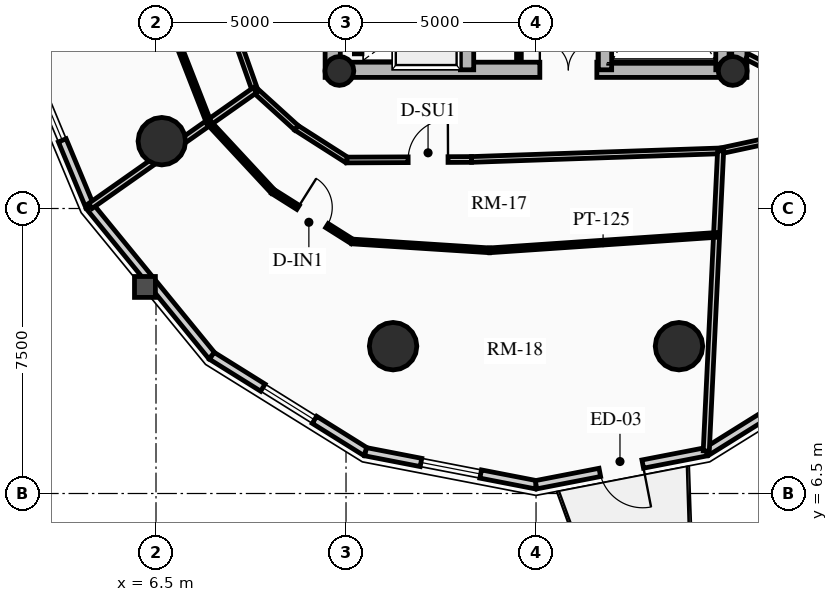
"""IFC4 building model, lengths in metres.
Left out: names, types, materials, properties, quantities, classifications, styles, units other than length and angle.
Written with IfcOpenShell. Run it as: python <this file> out.ifc"""

import sys

from ifc_helpers import new_model, si_unit, direction, frame, frame_2d, origin, origin_2d, place, context, subcontext, project, spatial, rectangle, circle, hollow_circle, extrude, source, transform, mapped, element, fill, save


model = new_model("IFC4")
c1 = context("Model", 3, precision=1e-05, world=origin(), true_north=direction((0.0, 1.0)))
c2 = subcontext(c1, "Body", "Model", "MODEL_VIEW")
j1 = project(units=[si_unit("LENGTHUNIT", "METRE"), si_unit("PLANEANGLEUNIT", "RADIAN")], contexts=[c1])
p1 = place(None, origin())
s1 = spatial("IfcSite", under=j1, at=p1, CompositionType="ELEMENT")
p2 = place(p1, origin())
s2 = spatial("IfcBuilding", under=s1, at=p2, CompositionType="ELEMENT")
p3 = place(p2, frame((0.0, 0.0, 163.24)))
s3 = spatial("IfcBuildingStorey", under=s2, at=p3, CompositionType="ELEMENT", Elevation=163.24)
for number, where, z_axis, x_axis in (
    (1, (11.15, 17.45, 0.0), (0.0, 0.0, 1.0), (0.0, 1.0, 0.0)),
    (2, (21.85, 17.45, 0.0), (0.0, 0.0, 1.0), (0.0, 1.0, 0.0)),
):
    element("IfcWall", number, at=place(p3, frame(where, z_axis=z_axis, x_axis=x_axis)), inside=s3, PredefinedType="SHEAR", context=c2, shape_type="SweptSolid", body=[
        extrude(rectangle(XDim=14.1, YDim=0.4, at=frame_2d((7.05, 0.0))), origin(), (0.0, 0.0, 1.0), 2.91),
    ])
p4 = place(p3, frame((11.15, 17.65, 0.0), z_axis=(0.0, 0.0, 1.0), x_axis=(1.0, 0.0, 0.0)))
e3 = element("IfcWall", 3, at=p4, inside=s3, PredefinedType="SHEAR", context=c2, shape_type="SweptSolid", body=[
    extrude(rectangle(XDim=10.7, YDim=0.4, at=frame_2d((5.35, 0.0))), origin(), (0.0, 0.0, 1.0), 2.91),
])
m1 = source(origin(), c2, "Body", "SweptSolid", [
    extrude(rectangle(XDim=1.5, YDim=2.02, at=frame_2d((0.75, 1.01))), frame((0.0, 0.21, 0.0), z_axis=(0.0, -1.0, 0.0), x_axis=(1.0, 0.0, 0.0)), (0.0, 0.0, 1.0), 0.42),
])
p5 = place(p4, frame((5.45, 0.0, 0.0)))
e4 = element("IfcOpeningElement", 4, at=p5, cuts=e3, PredefinedType="OPENING", context=c2, shape_type="MappedRepresentation", body=[
    mapped(m1, transform((0.0, 0.0, 0.0), x_axis=(1.0, 0.0, 0.0), y_axis=(0.0, 1.0, 0.0), z_axis=(0.0, 0.0, 1.0), scale=1.0)),
])
p6 = place(p3, frame((14.685, 17.65, 0.0), z_axis=(0.0, 0.0, 1.0), x_axis=(0.0, 1.0, 0.0)))
e5 = element("IfcWall", 5, at=p6, inside=s3, PredefinedType="SHEAR", context=c2, shape_type="SweptSolid", body=[
    extrude(rectangle(XDim=13.7, YDim=0.35, at=frame_2d((6.85, 0.0))), origin(), (0.0, 0.0, 1.0), 2.91),
])
m2 = source(origin(), c2, "Body", "SweptSolid", [
    extrude(rectangle(XDim=1.1, YDim=2.015, at=frame_2d((0.55, 1.007))), frame((0.0, 0.185, 0.0), z_axis=(0.0, -1.0, 0.0), x_axis=(1.0, 0.0, 0.0)), (0.0, 0.0, 1.0), 0.37),
])
p7 = place(p6, frame((4.85, 0.0, 0.0)))
e6 = element("IfcOpeningElement", 6, at=p7, cuts=e5, PredefinedType="OPENING", context=c2, shape_type="MappedRepresentation", body=[
    mapped(m2, transform((0.0, 0.0, 0.0), x_axis=(1.0, 0.0, 0.0), y_axis=(0.0, 1.0, 0.0), z_axis=(0.0, 0.0, 1.0), scale=1.0)),
])
p8 = place(p6, frame((0.625, 0.0, 0.0)))
e7 = element("IfcOpeningElement", 7, at=p8, cuts=e5, PredefinedType="OPENING", context=c2, shape_type="MappedRepresentation", body=[
    mapped(m2, transform((0.0, 0.0, 0.0), x_axis=(1.0, 0.0, 0.0), y_axis=(0.0, 1.0, 0.0), z_axis=(0.0, 0.0, 1.0), scale=1.0)),
])
p9 = place(p6, frame((2.625, 0.0, 0.0)))
e8 = element("IfcOpeningElement", 8, at=p9, cuts=e5, PredefinedType="OPENING", context=c2, shape_type="MappedRepresentation", body=[
    mapped(m2, transform((0.0, 0.0, 0.0), x_axis=(1.0, 0.0, 0.0), y_axis=(0.0, 1.0, 0.0), z_axis=(0.0, 0.0, 1.0), scale=1.0)),
])
m3 = source(origin(), c2, "Body", "SweptSolid", [
    extrude(rectangle(XDim=1.15, YDim=2.02, at=frame_2d((0.575, 1.01))), frame((0.0, 0.185, 0.0), z_axis=(0.0, -1.0, 0.0), x_axis=(1.0, 0.0, 0.0)), (0.0, 0.0, 1.0), 0.37),
])
p10 = place(p6, frame((7.27, 0.0, 0.0)))
e9 = element("IfcOpeningElement", 9, at=p10, cuts=e5, PredefinedType="OPENING", context=c2, shape_type="MappedRepresentation", body=[
    mapped(m3, transform((0.0, 0.0, 0.0), x_axis=(1.0, 0.0, 0.0), y_axis=(0.0, 1.0, 0.0), z_axis=(0.0, 0.0, 1.0), scale=1.0)),
])
p11 = place(p3, frame((18.315, 17.65, 0.0), z_axis=(0.0, 0.0, 1.0), x_axis=(0.0, 1.0, 0.0)))
e10 = element("IfcWall", 10, at=p11, inside=s3, PredefinedType="SHEAR", context=c2, shape_type="SweptSolid", body=[
    extrude(rectangle(XDim=9.6, YDim=0.35, at=frame_2d((4.8, 0.0))), origin(), (0.0, 0.0, 1.0), 2.91),
])
p12 = place(p11, frame((5.28, 0.0, 0.0)))
e11 = element("IfcOpeningElement", 11, at=p12, cuts=e10, PredefinedType="OPENING", context=c2, shape_type="MappedRepresentation", body=[
    mapped(m3, transform((0.0, 0.0, 0.0), x_axis=(1.0, 0.0, 0.0), y_axis=(0.0, 1.0, 0.0), z_axis=(0.0, 0.0, 1.0), scale=1.0)),
])
p13 = place(p3, frame((21.405, 17.65, 0.0), z_axis=(0.0, 0.0, 1.0), x_axis=(0.0, 1.0, 0.0)))
e12 = element("IfcWall", 12, at=p13, inside=s3, PredefinedType="SHEAR", context=c2, shape_type="SweptSolid", body=[
    extrude(rectangle(XDim=6.695, YDim=0.35, at=frame_2d((3.348, 0.0))), origin(), (0.0, 0.0, 1.0), 2.91),
])
for number, where, z_axis, x_axis in (
    (13, (11.325, 17.62, 0.0), (0.0, 0.0, 1.0), (1.0, 0.0, 0.0)),
    (14, (21.675, 17.62, 0.0), (0.0, 0.0, 1.0), (1.0, 0.0, 0.0)),
):
    element("IfcColumn", number, at=place(p3, frame(where, z_axis=z_axis, x_axis=x_axis)), inside=s3, PredefinedType="COLUMN", context=c2, shape_type="SweptSolid", body=[
        extrude(hollow_circle(Radius=0.38, WallThickness=0.032, at=origin_2d()), origin(), (0.0, 0.0, 1.0), 2.91),
    ])
for number, where, z_axis, x_axis in (
    (15, (6.653, 15.771, 0.0), (0.0, 0.0, 1.0), (1.0, 0.0, 0.0)),
    (16, (12.739, 10.377, 0.0), (0.0, 0.0, 1.0), (1.0, 0.0, 0.0)),
    (17, (20.261, 10.377, 0.0), (0.0, 0.0, 1.0), (1.0, 0.0, 0.0)),
):
    element("IfcColumn", number, at=place(p3, frame(where, z_axis=z_axis, x_axis=x_axis)), inside=s3, PredefinedType="USERDEFINED", context=c2, shape_type="SweptSolid", body=[
        extrude(circle(Radius=0.625, at=origin_2d()), origin(), (0.0, 0.0, 1.0), 2.91),
    ])
p14 = place(p3, frame((4.757, 14.055, 0.0), z_axis=(0.0, 0.0, 1.0), x_axis=(-0.384259959969, 0.923224936386, 0.0)))
e18 = element("IfcWall", 18, at=p14, inside=s3, PredefinedType="SOLIDWALL", context=c2, shape_type="SweptSolid", body=[
    extrude(rectangle(XDim=5.365, YDim=0.22, at=frame_2d((2.683, 0.0))), origin(), (0.0, 0.0, 1.0), 2.245),
])
m4 = source(origin(), c2, "Body", "SweptSolid", [
    extrude(rectangle(XDim=1.6, YDim=1.3, at=frame_2d((0.8, 0.65))), frame((0.0, 0.12, 0.0), z_axis=(0.0, -1.0, 0.0), x_axis=(1.0, 0.0, 0.0)), (0.0, 0.0, 1.0), 0.24),
])
p15 = place(p14, frame((1.883, 0.0, 0.65)))
e19 = element("IfcOpeningElement", 19, at=p15, cuts=e18, PredefinedType="OPENING", context=c2, shape_type="MappedRepresentation", body=[
    mapped(m4, transform((0.0, 0.0, 0.0), x_axis=(1.0, 0.0, 0.0), y_axis=(0.0, 1.0, 0.0), z_axis=(0.0, 0.0, 1.0), scale=1.0)),
])
p16 = place(p3, frame((7.968, 10.124, 0.0), z_axis=(0.0, 0.0, 1.0), x_axis=(-0.632598524901, 0.774479894053, 0.0)))
e20 = element("IfcWall", 20, at=p16, inside=s3, PredefinedType="SOLIDWALL", context=c2, shape_type="SweptSolid", body=[
    extrude(rectangle(XDim=5.076, YDim=0.22, at=frame_2d((2.538, 0.0))), origin(), (0.0, 0.0, 1.0), 2.245),
])
p17 = place(p3, frame((12.015, 7.6, 0.0), z_axis=(0.0, 0.0, 1.0), x_axis=(-0.848452391194, 0.529271707044, 0.0)))
e21 = element("IfcWall", 21, at=p17, inside=s3, PredefinedType="SOLIDWALL", context=c2, shape_type="SweptSolid", body=[
    extrude(rectangle(XDim=4.769, YDim=0.22, at=frame_2d((2.385, 0.0))), origin(), (0.0, 0.0, 1.0), 2.245),
])
p18 = place(p17, frame((1.585, 0.0, 0.65)))
e22 = element("IfcOpeningElement", 22, at=p18, cuts=e21, PredefinedType="OPENING", context=c2, shape_type="MappedRepresentation", body=[
    mapped(m4, transform((0.0, 0.0, 0.0), x_axis=(1.0, 0.0, 0.0), y_axis=(0.0, 1.0, 0.0), z_axis=(0.0, 0.0, 1.0), scale=1.0)),
])
p19 = place(p3, frame((16.5, 6.73, 0.0), z_axis=(0.0, 0.0, 1.0), x_axis=(-0.981718699963, 0.190337579429, 0.0)))
e23 = element("IfcWall", 23, at=p19, inside=s3, PredefinedType="SOLIDWALL", context=c2, shape_type="SweptSolid", body=[
    extrude(rectangle(XDim=4.569, YDim=0.22, at=frame_2d((2.284, 0.0))), origin(), (0.0, 0.0, 1.0), 2.245),
])
p20 = place(p19, frame((1.484, 0.0, 0.65)))
e24 = element("IfcOpeningElement", 24, at=p20, cuts=e23, PredefinedType="OPENING", context=c2, shape_type="MappedRepresentation", body=[
    mapped(m4, transform((0.0, 0.0, 0.0), x_axis=(1.0, 0.0, 0.0), y_axis=(0.0, 1.0, 0.0), z_axis=(0.0, 0.0, 1.0), scale=1.0)),
])
p21 = place(p3, frame((20.985, 7.6, 0.0), z_axis=(0.0, 0.0, 1.0), x_axis=(-0.981718699963, -0.190337579429, 0.0)))
e25 = element("IfcWall", 25, at=p21, inside=s3, PredefinedType="SOLIDWALL", context=c2, shape_type="SweptSolid", body=[
    extrude(rectangle(XDim=4.569, YDim=0.22, at=frame_2d((2.284, 0.0))), origin(), (0.0, 0.0, 1.0), 2.245),
])
m5 = source(origin(), c2, "Body", "SweptSolid", [
    extrude(rectangle(XDim=1.15, YDim=2.005, at=frame_2d((0.575, 1.002))), frame((0.0, 0.12, 0.0), z_axis=(0.0, -1.0, 0.0), x_axis=(1.0, 0.0, 0.0)), (0.0, 0.0, 1.0), 0.24),
])
p22 = place(p21, frame((1.709, 0.0, 0.0)))
e26 = element("IfcOpeningElement", 26, at=p22, cuts=e25, PredefinedType="OPENING", context=c2, shape_type="MappedRepresentation", body=[
    mapped(m5, transform((0.0, 0.0, 0.0), x_axis=(1.0, 0.0, 0.0), y_axis=(0.0, 1.0, 0.0), z_axis=(0.0, 0.0, 1.0), scale=1.0)),
])
p23 = place(p3, frame((25.032, 10.124, 0.0), z_axis=(0.0, 0.0, 1.0), x_axis=(-0.848452391194, -0.529271707044, 0.0)))
e27 = element("IfcWall", 27, at=p23, inside=s3, PredefinedType="SOLIDWALL", context=c2, shape_type="SweptSolid", body=[
    extrude(rectangle(XDim=4.769, YDim=0.22, at=frame_2d((2.385, 0.0))), origin(), (0.0, 0.0, 1.0), 2.245),
])
p24 = place(p3, frame((11.82, 18.07, 0.0), z_axis=(0.0, 0.0, 1.0), x_axis=(0.0, 1.0, 0.0)))
e28 = element("IfcWall", 28, at=p24, inside=s3, PredefinedType="SHEAR", context=c2, shape_type="SweptSolid", body=[
    extrude(rectangle(XDim=1.635, YDim=0.2, at=frame_2d((0.817, 0.0))), origin(), (0.0, 0.0, 1.0), 2.91),
])
p25 = place(p3, frame((16.05, 17.92, 0.0), z_axis=(0.0, 0.0, 1.0), x_axis=(0.0, 1.0, 0.0)))
e29 = element("IfcWall", 29, at=p25, inside=s3, PredefinedType="PARTITIONING", context=c2, shape_type="SweptSolid", body=[
    extrude(rectangle(XDim=3.08, YDim=0.125, at=frame_2d((1.54, 0.0))), origin(), (0.0, 0.0, 1.0), 2.675),
])
m6 = source(origin(), c2, "Body", "SweptSolid", [
    extrude(rectangle(XDim=0.9, YDim=2.005, at=frame_2d((0.45, 1.002))), frame((0.0, 0.073, 0.0), z_axis=(0.0, -1.0, 0.0), x_axis=(1.0, 0.0, 0.0)), (0.0, 0.0, 1.0), 0.145),
])
p26 = place(p25, frame((1.05, 0.0, 0.0)))
e30 = element("IfcOpeningElement", 30, at=p26, cuts=e29, PredefinedType="OPENING", context=c2, shape_type="MappedRepresentation", body=[
    mapped(m6, transform((0.0, 0.0, 0.0), x_axis=(1.0, 0.0, 0.0), y_axis=(0.0, 1.0, 0.0), z_axis=(0.0, 0.0, 1.0), scale=1.0)),
])
p27 = place(p3, frame((8.636, 18.436, 0.0), z_axis=(0.0, 0.0, 1.0), x_axis=(0.333211866524, -0.942851977782, 0.0)))
e31 = element("IfcWall", 31, at=p27, inside=s3, PredefinedType="PARTITIONING", context=c2, shape_type="SweptSolid", body=[
    extrude(rectangle(XDim=1.402, YDim=0.15, at=frame_2d((0.701, 0.0))), origin(), (0.0, 0.0, 1.0), 2.245),
])
p28 = place(p3, frame((9.103, 17.115, 0.0), z_axis=(0.0, 0.0, 1.0), x_axis=(0.740186897911, -0.672401186912, 0.0)))
e32 = element("IfcWall", 32, at=p28, inside=s3, PredefinedType="PARTITIONING", context=c2, shape_type="SweptSolid", body=[
    extrude(rectangle(XDim=1.477, YDim=0.15, at=frame_2d((0.738, 0.0))), origin(), (0.0, 0.0, 1.0), 2.245),
])
p29 = place(p3, frame((10.196, 16.122, 0.0), z_axis=(0.0, 0.0, 1.0), x_axis=(0.843021142441, -0.537880426673, 0.0)))
e33 = element("IfcWall", 33, at=p29, inside=s3, PredefinedType="PARTITIONING", context=c2, shape_type="SweptSolid", body=[
    extrude(rectangle(XDim=1.571, YDim=0.15, at=frame_2d((0.786, 0.0))), origin(), (0.0, 0.0, 1.0), 2.245),
])
p30 = place(p3, frame((11.521, 15.276, 0.0), z_axis=(0.0, 0.0, 1.0), x_axis=(0.999990688463, 0.004315436007, 0.0)))
e34 = element("IfcWall", 34, at=p30, inside=s3, PredefinedType="PARTITIONING", context=c2, shape_type="SweptSolid", body=[
    extrude(rectangle(XDim=3.281, YDim=0.15, at=frame_2d((1.641, 0.0))), origin(), (0.0, 0.0, 1.0), 2.245),
])
m7 = source(origin(), c2, "Body", "SweptSolid", [
    extrude(rectangle(XDim=1.05, YDim=2.015, at=frame_2d((0.525, 1.007))), frame((0.0, 0.085, 0.0), z_axis=(0.0, -1.0, 0.0), x_axis=(1.0, 0.0, 0.0)), (0.0, 0.0, 1.0), 0.17),
])
p31 = place(p30, frame((1.613, 0.0, 0.0)))
e35 = element("IfcOpeningElement", 35, at=p31, cuts=e34, PredefinedType="OPENING", context=c2, shape_type="MappedRepresentation", body=[
    mapped(m7, transform((0.0, 0.0, 0.0), x_axis=(1.0, 0.0, 0.0), y_axis=(0.0, 1.0, 0.0), z_axis=(0.0, 0.0, 1.0), scale=1.0)),
])
p32 = place(p3, frame((14.802, 15.291, 0.0), z_axis=(0.0, 0.0, 1.0), x_axis=(0.999405778293, 0.034468686011, 0.0)))
e36 = element("IfcWall", 36, at=p32, inside=s3, PredefinedType="PARTITIONING", context=c2, shape_type="SweptSolid", body=[
    extrude(rectangle(XDim=6.559, YDim=0.15, at=frame_2d((3.279, 0.0))), origin(), (0.0, 0.0, 1.0), 2.245),
])
p33 = place(p3, frame((21.357, 15.517, 0.0), z_axis=(0.0, 0.0, 1.0), x_axis=(0.977773676035, 0.209663154733, 0.0)))
e37 = element("IfcWall", 37, at=p33, inside=s3, PredefinedType="PARTITIONING", context=c2, shape_type="SweptSolid", body=[
    extrude(rectangle(XDim=1.865, YDim=0.15, at=frame_2d((0.933, 0.0))), origin(), (0.0, 0.0, 1.0), 2.245),
])
p34 = place(p3, frame((9.103, 17.115, 0.0), z_axis=(0.0, 0.0, 1.0), x_axis=(-0.817760605426, -0.575558504597, 0.0)))
e38 = element("IfcWall", 38, at=p34, inside=s3, PredefinedType="PARTITIONING", context=c2, shape_type="SweptSolid", body=[
    extrude(rectangle(XDim=5.295, YDim=0.16, at=frame_2d((2.647, 0.0))), origin(), (0.0, 0.0, 1.0), 2.245),
])
p35 = place(p3, frame((21.357, 15.517, 0.0), z_axis=(0.0, 0.0, 1.0), x_axis=(-0.047796931987, -0.998857073506, 0.0)))
e39 = element("IfcWall", 39, at=p35, inside=s3, PredefinedType="PARTITIONING", context=c2, shape_type="SweptSolid", body=[
    extrude(rectangle(XDim=7.907, YDim=0.16, at=frame_2d((3.954, 0.0))), origin(), (0.0, 0.0, 1.0), 2.245),
])
p36 = place(p3, frame((22.05, 18.0, 0.0), z_axis=(0.0, 0.0, 1.0), x_axis=(0.890660222535, -0.454669515136, 0.0)))
e40 = element("IfcWall", 40, at=p36, inside=s3, PredefinedType="PARTITIONING", context=c2, shape_type="SweptSolid", body=[
    extrude(rectangle(XDim=2.144, YDim=0.16, at=frame_2d((1.072, 0.0))), origin(), (0.0, 0.0, 1.0), 2.245),
])
m8 = source(origin(), c2, "Body", "SweptSolid", [
    extrude(rectangle(XDim=1.05, YDim=2.015, at=frame_2d((0.525, 1.007))), frame((0.0, 0.09, 0.0), z_axis=(0.0, -1.0, 0.0), x_axis=(1.0, 0.0, 0.0)), (0.0, 0.0, 1.0), 0.18),
])
p37 = place(p36, frame((0.894, 0.0, 0.0)))
e41 = element("IfcOpeningElement", 41, at=p37, cuts=e40, PredefinedType="OPENING", context=c2, shape_type="MappedRepresentation", body=[
    mapped(m8, transform((0.0, 0.0, 0.0), x_axis=(1.0, 0.0, 0.0), y_axis=(0.0, 1.0, 0.0), z_axis=(0.0, 0.0, 1.0), scale=1.0)),
])
p38 = place(p3, frame((6.978, 18.598, 0.0), z_axis=(0.0, 0.0, 1.0), x_axis=(0.363845250376, -0.931459410698, 0.0)))
e42 = element("IfcWall", 42, at=p38, inside=s3, PredefinedType="PARTITIONING", context=c2, shape_type="SweptSolid", body=[
    extrude(rectangle(XDim=2.509, YDim=0.125, at=frame_2d((1.254, 0.0))), origin(), (0.0, 0.0, 1.0), 2.245),
])
p39 = place(p3, frame((7.891, 16.261, 0.0), z_axis=(0.0, 0.0, 1.0), x_axis=(0.680443535441, -0.7328005152, 0.0)))
e43 = element("IfcWall", 43, at=p39, inside=s3, PredefinedType="PARTITIONING", context=c2, shape_type="SweptSolid", body=[
    extrude(rectangle(XDim=2.476, YDim=0.125, at=frame_2d((1.238, 0.0))), origin(), (0.0, 0.0, 1.0), 2.245),
])
p40 = place(p3, frame((9.576, 14.447, 0.0), z_axis=(0.0, 0.0, 1.0), x_axis=(0.845905204383, -0.53333327779, 0.0)))
e44 = element("IfcWall", 44, at=p40, inside=s3, PredefinedType="PARTITIONING", context=c2, shape_type="SweptSolid", body=[
    extrude(rectangle(XDim=2.465, YDim=0.125, at=frame_2d((1.232, 0.0))), origin(), (0.0, 0.0, 1.0), 2.245),
])
p41 = place(p40, frame((0.782, 0.0, 0.0)))
e45 = element("IfcOpeningElement", 45, at=p41, cuts=e44, PredefinedType="OPENING", context=c2, shape_type="MappedRepresentation", body=[
    mapped(m6, transform((0.0, 0.0, 0.0), x_axis=(1.0, 0.0, 0.0), y_axis=(0.0, 1.0, 0.0), z_axis=(0.0, 0.0, 1.0), scale=1.0)),
])
p42 = place(p3, frame((11.661, 13.132, 0.0), z_axis=(0.0, 0.0, 1.0), x_axis=(0.997932841329, -0.064265419915, 0.0)))
e46 = element("IfcWall", 46, at=p42, inside=s3, PredefinedType="PARTITIONING", context=c2, shape_type="SweptSolid", body=[
    extrude(rectangle(XDim=3.624, YDim=0.125, at=frame_2d((1.812, 0.0))), origin(), (0.0, 0.0, 1.0), 2.245),
])
p43 = place(p3, frame((15.278, 12.899, 0.0), z_axis=(0.0, 0.0, 1.0), x_axis=(0.997695501463, 0.067850470592, 0.0)))
e47 = element("IfcWall", 47, at=p43, inside=s3, PredefinedType="PARTITIONING", context=c2, shape_type="SweptSolid", body=[
    extrude(rectangle(XDim=5.988, YDim=0.125, at=frame_2d((2.994, 0.0))), origin(), (0.0, 0.0, 1.0), 2.245),
])
m9 = source(origin(), c2, "Body", "SweptSolid", [
    extrude(rectangle(XDim=1.6, YDim=1.3, at=frame_2d((0.8, 0.65))), frame((0.0, 0.03, 0.0), z_axis=(0.0, -1.0, 0.0), x_axis=(1.0, 0.0, 0.0)), (0.0, 0.0, 1.0), 0.06),
])
p44 = place(p15, origin())
e48 = element("IfcWindow", 48, at=p44, inside=s3, PartitioningType="SINGLE_PANEL", PredefinedType="WINDOW", context=c2, shape_type="MappedRepresentation", body=[
    mapped(m9, transform((0.0, 0.0, 0.0), x_axis=(1.0, 0.0, 0.0), y_axis=(0.0, 1.0, 0.0), z_axis=(0.0, 0.0, 1.0), scale=1.0)),
])
fill(e19, e48)
p45 = place(p18, origin())
e49 = element("IfcWindow", 49, at=p45, inside=s3, PartitioningType="SINGLE_PANEL", PredefinedType="WINDOW", context=c2, shape_type="MappedRepresentation", body=[
    mapped(m9, transform((0.0, 0.0, 0.0), x_axis=(1.0, 0.0, 0.0), y_axis=(0.0, 1.0, 0.0), z_axis=(0.0, 0.0, 1.0), scale=1.0)),
])
fill(e22, e49)
p46 = place(p20, origin())
e50 = element("IfcWindow", 50, at=p46, inside=s3, PartitioningType="SINGLE_PANEL", PredefinedType="WINDOW", context=c2, shape_type="MappedRepresentation", body=[
    mapped(m9, transform((0.0, 0.0, 0.0), x_axis=(1.0, 0.0, 0.0), y_axis=(0.0, 1.0, 0.0), z_axis=(0.0, 0.0, 1.0), scale=1.0)),
])
fill(e24, e50)
m10 = source(origin(), c2, "Body", "SweptSolid", [
    extrude(rectangle(XDim=1.15, YDim=2.005, at=frame_2d((0.575, 1.002))), frame((0.0, 0.025, 0.0), z_axis=(0.0, -1.0, 0.0), x_axis=(1.0, 0.0, 0.0)), (0.0, 0.0, 1.0), 0.05),
])
p47 = place(p22, origin())
e51 = element("IfcDoor", 51, at=p47, inside=s3, OperationType="SINGLE_SWING_LEFT", PredefinedType="DOOR", context=c2, shape_type="MappedRepresentation", body=[
    mapped(m10, transform((0.0, 0.0, 0.0), x_axis=(1.0, 0.0, 0.0), y_axis=(0.0, 1.0, 0.0), z_axis=(0.0, 0.0, 1.0), scale=1.0)),
])
fill(e26, e51)
m11 = source(origin(), c2, "Body", "SweptSolid", [
    extrude(rectangle(XDim=1.5, YDim=2.02, at=frame_2d((0.75, 1.01))), frame((0.0, 0.025, 0.0), z_axis=(0.0, -1.0, 0.0), x_axis=(1.0, 0.0, 0.0)), (0.0, 0.0, 1.0), 0.05),
])
p48 = place(p5, origin())
e52 = element("IfcDoor", 52, at=p48, inside=s3, OperationType="DOUBLE_DOOR_SINGLE_SWING", PredefinedType="DOOR", context=c2, shape_type="MappedRepresentation", body=[
    mapped(m11, transform((0.0, 0.0, 0.0), x_axis=(1.0, 0.0, 0.0), y_axis=(0.0, 1.0, 0.0), z_axis=(0.0, 0.0, 1.0), scale=1.0)),
])
fill(e4, e52)
m12 = source(origin(), c2, "Body", "SweptSolid", [
    extrude(rectangle(XDim=1.05, YDim=2.015, at=frame_2d((0.525, 1.007))), frame((0.0, 0.025, 0.0), z_axis=(0.0, -1.0, 0.0), x_axis=(1.0, 0.0, 0.0)), (0.0, 0.0, 1.0), 0.05),
])
p49 = place(p31, origin())
e53 = element("IfcDoor", 53, at=p49, inside=s3, OperationType="SINGLE_SWING_RIGHT", PredefinedType="DOOR", context=c2, shape_type="MappedRepresentation", body=[
    mapped(m12, transform((0.0, 0.0, 0.0), x_axis=(1.0, 0.0, 0.0), y_axis=(0.0, 1.0, 0.0), z_axis=(0.0, 0.0, 1.0), scale=1.0)),
])
fill(e35, e53)
m13 = source(origin(), c2, "Body", "SweptSolid", [
    extrude(rectangle(XDim=0.9, YDim=2.005, at=frame_2d((0.45, 1.002))), frame((0.0, 0.025, 0.0), z_axis=(0.0, -1.0, 0.0), x_axis=(1.0, 0.0, 0.0)), (0.0, 0.0, 1.0), 0.05),
])
p50 = place(p41, origin())
e54 = element("IfcDoor", 54, at=p50, inside=s3, OperationType="SINGLE_SWING_LEFT", PredefinedType="DOOR", context=c2, shape_type="MappedRepresentation", body=[
    mapped(m13, transform((0.0, 0.0, 0.0), x_axis=(1.0, 0.0, 0.0), y_axis=(0.0, 1.0, 0.0), z_axis=(0.0, 0.0, 1.0), scale=1.0)),
])
fill(e45, e54)
save(model, sys.argv[1])
